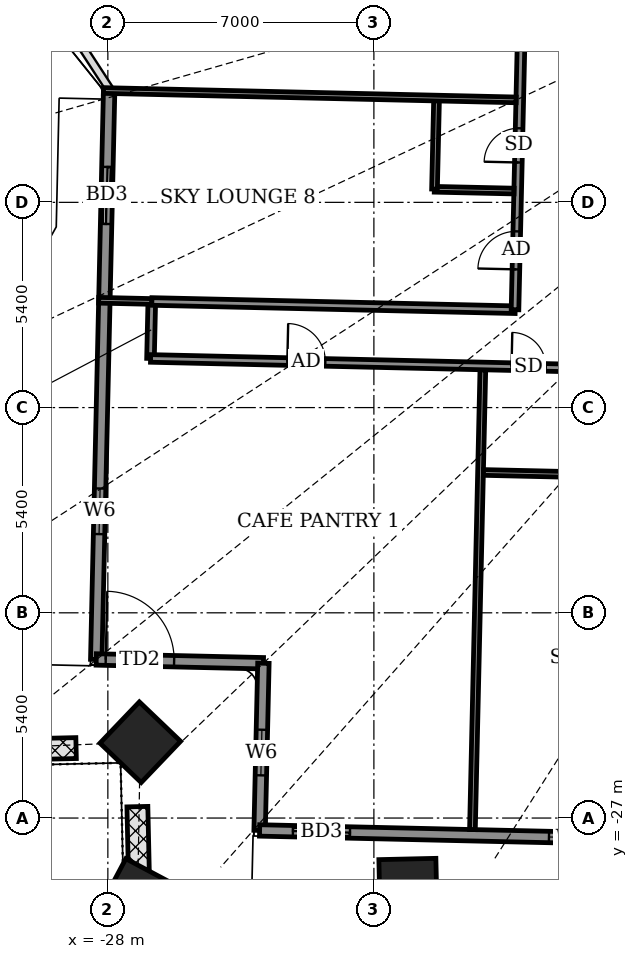
"""IFC4 building model, lengths in metres.
Left out: names, types, materials, properties, quantities, classifications, styles, units other than length and angle.
Written with IfcOpenShell. Run it as: python <this file> out.ifc"""

import sys

from ifc_helpers import new_model, si_unit, direction, frame, frame_2d, origin, origin_2d, place, context, subcontext, project, spatial, rectangle, extrude, element, fill, save


model = new_model("IFC4")
c1 = context("Model", 3, precision=1e-05, world=origin(), true_north=direction((0.0, 1.0)))
c2 = subcontext(c1, "Body", "Model", "MODEL_VIEW")
j1 = project(units=[si_unit("LENGTHUNIT", "METRE"), si_unit("PLANEANGLEUNIT", "RADIAN")], contexts=[c1])
p1 = place(None, origin())
s1 = spatial("IfcSite", under=j1, at=p1, CompositionType="ELEMENT")
p2 = place(p1, origin())
s2 = spatial("IfcBuilding", under=s1, at=p2, CompositionType="ELEMENT")
p3 = place(p2, frame((0.0, 0.0, 52.1)))
s3 = spatial("IfcBuildingStorey", under=s2, at=p3, CompositionType="ELEMENT", Elevation=52.1)
for number, where, z_axis, x_axis in (
    (1, (-27.147, -25.005, -0.55), (0.0, 0.0, 1.0), (0.723, -0.691, 0.0)),
    (2, (-27.217, -29.084, -0.55), (0.0, 0.0, 1.0), (0.883, -0.469, 0.0)),
    (3, (-20.102, -28.827, -0.55), (0.0, 0.0, 1.0), (1.0, 0.023, 0.0)),
):
    element("IfcColumn", number, at=place(p3, frame(where, z_axis=z_axis, x_axis=x_axis)), inside=s3, PredefinedType="COLUMN", context=c2, shape_type="SweptSolid", body=[
        extrude(rectangle(XDim=1.5, YDim=1.5, at=origin_2d()), origin(), (0.0, 0.0, 1.0), 4.6),
    ])
p4 = place(p3, frame((-27.965, -7.802, 0.0), z_axis=(0.0, 0.0, 1.0), x_axis=(-0.02267786199, -0.999742824218, 0.0)))
e4 = element("IfcWall", 4, at=p4, inside=s3, PredefinedType="SOLIDWALL", context=c2, shape_type="SweptSolid", body=[
    extrude(rectangle(XDim=15.029, YDim=0.3, at=frame_2d((7.514, 0.0))), origin(), (0.0, 0.0, 1.0), 2.1),
])
p5 = place(p4, frame((2.067, 0.0, 0.0)))
e5 = element("IfcOpeningElement", 5, at=p5, cuts=e4, PredefinedType="OPENING", context=c2, shape_type="SweptSolid", body=[
    extrude(rectangle(XDim=1.5, YDim=2.0, at=frame_2d((0.75, 1.0))), frame((0.0, 0.16, 0.0), z_axis=(0.0, -1.0, 0.0), x_axis=(1.0, 0.0, 0.0)), (0.0, 0.0, 1.0), 0.32),
])
p6 = place(p4, frame((10.53, 0.0, 0.5)))
e6 = element("IfcOpeningElement", 6, at=p6, cuts=e4, PredefinedType="OPENING", context=c2, shape_type="SweptSolid", body=[
    extrude(rectangle(XDim=1.2, YDim=1.1, at=frame_2d((0.6, 0.55))), frame((0.0, 0.16, 0.0), z_axis=(0.0, -1.0, 0.0), x_axis=(1.0, 0.0, 0.0)), (0.0, 0.0, 1.0), 0.32),
])
p7 = place(p3, frame((-28.306, -22.827, 0.0), z_axis=(0.0, 0.0, 1.0), x_axis=(0.999741204967, -0.022749133868, 0.0)))
e7 = element("IfcWall", 7, at=p7, inside=s3, PredefinedType="SOLIDWALL", context=c2, shape_type="SweptSolid", body=[
    extrude(rectangle(XDim=4.4, YDim=0.3, at=frame_2d((2.2, 0.0))), origin(), (0.0, 0.0, 1.0), 2.1),
])
p8 = place(p7, frame((0.25, 0.0, 0.0)))
e8 = element("IfcOpeningElement", 8, at=p8, cuts=e7, PredefinedType="OPENING", context=c2, shape_type="SweptSolid", body=[
    extrude(rectangle(XDim=1.8, YDim=2.0, at=frame_2d((0.9, 1.0))), frame((0.0, 0.16, 0.0), z_axis=(0.0, -1.0, 0.0), x_axis=(1.0, 0.0, 0.0)), (0.0, 0.0, 1.0), 0.32),
])
p9 = place(p3, frame((-23.907, -22.927, 0.0), z_axis=(0.0, 0.0, 1.0), x_axis=(-0.022749133868, -0.999741204967, 0.0)))
e9 = element("IfcWall", 9, at=p9, inside=s3, PredefinedType="SOLIDWALL", context=c2, shape_type="SweptSolid", body=[
    extrude(rectangle(XDim=4.4, YDim=0.3, at=frame_2d((2.2, 0.0))), origin(), (0.0, 0.0, 1.0), 2.1),
])
p10 = place(p9, frame((1.75, 0.0, 0.5)))
e10 = element("IfcOpeningElement", 10, at=p10, cuts=e9, PredefinedType="OPENING", context=c2, shape_type="SweptSolid", body=[
    extrude(rectangle(XDim=1.2, YDim=1.1, at=frame_2d((0.6, 0.55))), frame((0.0, 0.16, 0.0), z_axis=(0.0, -1.0, 0.0), x_axis=(1.0, 0.0, 0.0)), (0.0, 0.0, 1.0), 0.32),
])
p11 = place(p3, frame((-24.007, -27.326, 0.0), z_axis=(0.0, 0.0, 1.0), x_axis=(0.999742536491, -0.022690542744, 0.0)))
e11 = element("IfcWall", 11, at=p11, inside=s3, PredefinedType="SOLIDWALL", context=c2, shape_type="SweptSolid", body=[
    extrude(rectangle(XDim=49.236, YDim=0.3, at=frame_2d((24.618, 0.0))), origin(), (0.0, 0.0, 1.0), 2.1),
])
p12 = place(p11, frame((0.878, 0.0, 0.0)))
e12 = element("IfcOpeningElement", 12, at=p12, cuts=e11, PredefinedType="OPENING", context=c2, shape_type="SweptSolid", body=[
    extrude(rectangle(XDim=1.5, YDim=2.0, at=frame_2d((0.75, 1.0))), frame((0.0, 0.16, 0.0), z_axis=(0.0, -1.0, 0.0), x_axis=(1.0, 0.0, 0.0)), (0.0, 0.0, 1.0), 0.32),
])
p13 = place(p11, frame((7.616, 0.0, 0.5)))
e13 = element("IfcOpeningElement", 13, at=p13, cuts=e11, PredefinedType="OPENING", context=c2, shape_type="SweptSolid", body=[
    extrude(rectangle(XDim=1.2, YDim=1.1, at=frame_2d((0.6, 0.55))), frame((0.0, 0.16, 0.0), z_axis=(0.0, -1.0, 0.0), x_axis=(1.0, 0.0, 0.0)), (0.0, 0.0, 1.0), 0.32),
])
p14 = place(p11, frame((15.205, 0.0, 0.0)))
e14 = element("IfcOpeningElement", 14, at=p14, cuts=e11, PredefinedType="OPENING", context=c2, shape_type="SweptSolid", body=[
    extrude(rectangle(XDim=1.5, YDim=2.0, at=frame_2d((0.75, 1.0))), frame((0.0, 0.16, 0.0), z_axis=(0.0, -1.0, 0.0), x_axis=(1.0, 0.0, 0.0)), (0.0, 0.0, 1.0), 0.32),
])
p15 = place(p11, frame((20.663, 0.0, 0.0)))
e15 = element("IfcOpeningElement", 15, at=p15, cuts=e11, PredefinedType="OPENING", context=c2, shape_type="SweptSolid", body=[
    extrude(rectangle(XDim=1.5, YDim=2.0, at=frame_2d((0.75, 1.0))), frame((0.0, 0.16, 0.0), z_axis=(0.0, -1.0, 0.0), x_axis=(1.0, 0.0, 0.0)), (0.0, 0.0, 1.0), 0.32),
])
p16 = place(p11, frame((23.869, 0.0, 0.0)))
e16 = element("IfcOpeningElement", 16, at=p16, cuts=e11, PredefinedType="OPENING", context=c2, shape_type="SweptSolid", body=[
    extrude(rectangle(XDim=1.5, YDim=2.0, at=frame_2d((0.75, 1.0))), frame((0.0, 0.16, 0.0), z_axis=(0.0, -1.0, 0.0), x_axis=(1.0, 0.0, 0.0)), (0.0, 0.0, 1.0), 0.32),
])
p17 = place(p11, frame((30.183, 0.0, 0.5)))
e17 = element("IfcOpeningElement", 17, at=p17, cuts=e11, PredefinedType="OPENING", context=c2, shape_type="SweptSolid", body=[
    extrude(rectangle(XDim=1.2, YDim=1.1, at=frame_2d((0.6, 0.55))), frame((0.0, 0.16, 0.0), z_axis=(0.0, -1.0, 0.0), x_axis=(1.0, 0.0, 0.0)), (0.0, 0.0, 1.0), 0.32),
])
p18 = place(p11, frame((37.922, 0.0, 0.5)))
e18 = element("IfcOpeningElement", 18, at=p18, cuts=e11, PredefinedType="OPENING", context=c2, shape_type="SweptSolid", body=[
    extrude(rectangle(XDim=1.2, YDim=1.1, at=frame_2d((0.6, 0.55))), frame((0.0, 0.16, 0.0), z_axis=(0.0, -1.0, 0.0), x_axis=(1.0, 0.0, 0.0)), (0.0, 0.0, 1.0), 0.32),
])
p19 = place(p11, frame((44.248, 0.0, 0.5)))
e19 = element("IfcOpeningElement", 19, at=p19, cuts=e11, PredefinedType="OPENING", context=c2, shape_type="SweptSolid", body=[
    extrude(rectangle(XDim=1.2, YDim=1.1, at=frame_2d((0.6, 0.55))), frame((0.0, 0.16, 0.0), z_axis=(0.0, -1.0, 0.0), x_axis=(1.0, 0.0, 0.0)), (0.0, 0.0, 1.0), 0.32),
])
for number, where, z_axis, x_axis in (
    (20, (-27.174, -28.887, 0.0), (0.0, 0.0, 1.0), (-0.022, 1.0, 0.0)),
    (21, (-28.836, -25.159, 0.0), (0.0, 0.0, 1.0), (-1.0, -0.023, 0.0)),
):
    element("IfcWall", number, at=place(p3, frame(where, z_axis=z_axis, x_axis=x_axis)), inside=s3, PredefinedType="USERDEFINED", context=c2, shape_type="SweptSolid", body=[
        extrude(rectangle(XDim=2.188, YDim=0.55, at=frame_2d((1.094, 0.0))), origin(), (0.0, 0.0, 1.0), 0.8),
    ])
p20 = place(p3, frame((-18.407, -27.303, 0.0), z_axis=(0.0, 0.0, 1.0), x_axis=(0.02263844782, 0.9997437175, 0.0)))
e22 = element("IfcWall", 22, at=p20, inside=s3, PredefinedType="PARTITIONING", context=c2, shape_type="SweptSolid", body=[
    extrude(rectangle(XDim=12.1, YDim=0.15, at=frame_2d((6.05, 0.0))), origin(), (0.0, 0.0, 1.0), 2.1),
])
p21 = place(p3, frame((-18.117, -17.907, 0.0), z_axis=(0.0, 0.0, 1.0), x_axis=(0.999740478815, -0.022781023197, 0.0)))
e23 = element("IfcWall", 23, at=p21, inside=s3, PredefinedType="PARTITIONING", context=c2, shape_type="SweptSolid", body=[
    extrude(rectangle(XDim=2.325, YDim=0.15, at=frame_2d((1.163, 0.0))), origin(), (0.0, 0.0, 1.0), 2.1),
])
p22 = place(p3, frame((-26.878, -14.907, 0.0), z_axis=(0.0, 0.0, 1.0), x_axis=(0.022632637625, 0.99974384905, 0.0)))
e24 = element("IfcWall", 24, at=p22, inside=s3, PredefinedType="PARTITIONING", context=c2, shape_type="SweptSolid", body=[
    extrude(rectangle(XDim=1.5, YDim=0.2, at=frame_2d((0.75, 0.0))), origin(), (0.0, 0.0, 1.0), 4.05),
])
p23 = place(p3, frame((-26.876, -14.907, 0.0), z_axis=(0.0, 0.0, 1.0), x_axis=(0.99974254105, -0.022690341881, 0.0)))
e25 = element("IfcWall", 25, at=p23, inside=s3, PredefinedType="PARTITIONING", context=c2, shape_type="SweptSolid", body=[
    extrude(rectangle(XDim=53.024, YDim=0.2, at=frame_2d((26.512, 0.0))), origin(), (0.0, 0.0, 1.0), 2.1),
])
p24 = place(p23, frame((3.599, 0.0, 0.0)))
e26 = element("IfcOpeningElement", 26, at=p24, cuts=e25, PredefinedType="OPENING", context=c2, shape_type="SweptSolid", body=[
    extrude(rectangle(XDim=1.0, YDim=2.1, at=frame_2d((0.5, 1.05))), frame((0.0, 0.11, 0.0), z_axis=(0.0, -1.0, 0.0), x_axis=(1.0, 0.0, 0.0)), (0.0, 0.0, 1.0), 0.22),
])
p25 = place(p23, frame((13.425, 0.0, 0.0)))
e27 = element("IfcOpeningElement", 27, at=p25, cuts=e25, PredefinedType="OPENING", context=c2, shape_type="SweptSolid", body=[
    extrude(rectangle(XDim=1.0, YDim=2.1, at=frame_2d((0.5, 1.05))), frame((0.0, 0.11, 0.0), z_axis=(0.0, -1.0, 0.0), x_axis=(1.0, 0.0, 0.0)), (0.0, 0.0, 1.0), 0.22),
])
p26 = place(p23, frame((9.5, 0.0, 0.0)))
e28 = element("IfcOpeningElement", 28, at=p26, cuts=e25, PredefinedType="OPENING", context=c2, shape_type="SweptSolid", body=[
    extrude(rectangle(XDim=0.9, YDim=2.1, at=frame_2d((0.45, 1.05))), frame((0.0, 0.11, 0.0), z_axis=(0.0, -1.0, 0.0), x_axis=(1.0, 0.0, 0.0)), (0.0, 0.0, 1.0), 0.22),
])
p27 = place(p23, frame((17.525, 0.0, 0.0)))
e29 = element("IfcOpeningElement", 29, at=p27, cuts=e25, PredefinedType="OPENING", context=c2, shape_type="SweptSolid", body=[
    extrude(rectangle(XDim=0.9, YDim=2.1, at=frame_2d((0.45, 1.05))), frame((0.0, 0.11, 0.0), z_axis=(0.0, -1.0, 0.0), x_axis=(1.0, 0.0, 0.0)), (0.0, 0.0, 1.0), 0.22),
])
p28 = place(p23, frame((24.85, 0.0, 0.0)))
e30 = element("IfcOpeningElement", 30, at=p28, cuts=e25, PredefinedType="OPENING", context=c2, shape_type="SweptSolid", body=[
    extrude(rectangle(XDim=0.9, YDim=2.1, at=frame_2d((0.45, 1.05))), frame((0.0, 0.11, 0.0), z_axis=(0.0, -1.0, 0.0), x_axis=(1.0, 0.0, 0.0)), (0.0, 0.0, 1.0), 0.22),
])
p29 = place(p23, frame((27.35, 0.0, 0.0)))
e31 = element("IfcOpeningElement", 31, at=p29, cuts=e25, PredefinedType="OPENING", context=c2, shape_type="SweptSolid", body=[
    extrude(rectangle(XDim=0.9, YDim=2.1, at=frame_2d((0.45, 1.05))), frame((0.0, 0.11, 0.0), z_axis=(0.0, -1.0, 0.0), x_axis=(1.0, 0.0, 0.0)), (0.0, 0.0, 1.0), 0.22),
])
p30 = place(p23, frame((36.15, 0.0, 0.0)))
e32 = element("IfcOpeningElement", 32, at=p30, cuts=e25, PredefinedType="OPENING", context=c2, shape_type="SweptSolid", body=[
    extrude(rectangle(XDim=1.0, YDim=2.1, at=frame_2d((0.5, 1.05))), frame((0.0, 0.11, 0.0), z_axis=(0.0, -1.0, 0.0), x_axis=(1.0, 0.0, 0.0)), (0.0, 0.0, 1.0), 0.22),
])
p31 = place(p23, frame((32.2, 0.0, 0.0)))
e33 = element("IfcOpeningElement", 33, at=p31, cuts=e25, PredefinedType="OPENING", context=c2, shape_type="SweptSolid", body=[
    extrude(rectangle(XDim=0.9, YDim=2.1, at=frame_2d((0.45, 1.05))), frame((0.0, 0.11, 0.0), z_axis=(0.0, -1.0, 0.0), x_axis=(1.0, 0.0, 0.0)), (0.0, 0.0, 1.0), 0.22),
])
p32 = place(p23, frame((40.675, 0.0, 0.0)))
e34 = element("IfcOpeningElement", 34, at=p32, cuts=e25, PredefinedType="OPENING", context=c2, shape_type="SweptSolid", body=[
    extrude(rectangle(XDim=1.0, YDim=2.1, at=frame_2d((0.5, 1.05))), frame((0.0, 0.11, 0.0), z_axis=(0.0, -1.0, 0.0), x_axis=(1.0, 0.0, 0.0)), (0.0, 0.0, 1.0), 0.22),
])
p33 = place(p23, frame((43.65, 0.0, 0.0)))
e35 = element("IfcOpeningElement", 35, at=p33, cuts=e25, PredefinedType="OPENING", context=c2, shape_type="SweptSolid", body=[
    extrude(rectangle(XDim=0.9, YDim=2.1, at=frame_2d((0.45, 1.05))), frame((0.0, 0.11, 0.0), z_axis=(0.0, -1.0, 0.0), x_axis=(1.0, 0.0, 0.0)), (0.0, 0.0, 1.0), 0.22),
])
p34 = place(p23, frame((51.824, 0.0, 0.0)))
e36 = element("IfcOpeningElement", 36, at=p34, cuts=e25, PredefinedType="OPENING", context=c2, shape_type="SweptSolid", body=[
    extrude(rectangle(XDim=1.0, YDim=2.1, at=frame_2d((0.5, 1.05))), frame((0.0, 0.11, 0.0), z_axis=(0.0, -1.0, 0.0), x_axis=(1.0, 0.0, 0.0)), (0.0, 0.0, 1.0), 0.22),
])
p35 = place(p23, frame((46.15, 0.0, 0.0)))
e37 = element("IfcOpeningElement", 37, at=p35, cuts=e25, PredefinedType="OPENING", context=c2, shape_type="SweptSolid", body=[
    extrude(rectangle(XDim=0.9, YDim=2.1, at=frame_2d((0.45, 1.05))), frame((0.0, 0.11, 0.0), z_axis=(0.0, -1.0, 0.0), x_axis=(1.0, 0.0, 0.0)), (0.0, 0.0, 1.0), 0.22),
])
p36 = place(p3, frame((-28.242, -13.376, 0.0), z_axis=(0.0, 0.0, 1.0), x_axis=(0.999739128131, -0.022840220751, 0.0)))
e38 = element("IfcWall", 38, at=p36, inside=s3, PredefinedType="PARTITIONING", context=c2, shape_type="SweptSolid", body=[
    extrude(rectangle(XDim=1.4, YDim=0.15, at=frame_2d((0.7, 0.0))), origin(), (0.0, 0.0, 1.0), 2.15),
])
p37 = place(p3, frame((-26.842, -13.408, 0.0), z_axis=(0.0, 0.0, 1.0), x_axis=(0.999742388837, -0.022697047441, 0.0)))
e39 = element("IfcWall", 39, at=p37, inside=s3, PredefinedType="PARTITIONING", context=c2, shape_type="SweptSolid", body=[
    extrude(rectangle(XDim=9.562, YDim=0.2, at=frame_2d((4.781, 0.0))), origin(), (0.0, 0.0, 1.0), 2.1),
])
p38 = place(p3, frame((-17.287, -13.625, 0.0), z_axis=(0.0, 0.0, 1.0), x_axis=(0.022712214871, 0.999742044377, 0.0)))
e40 = element("IfcWall", 40, at=p38, inside=s3, PredefinedType="PARTITIONING", context=c2, shape_type="SweptSolid", body=[
    extrude(rectangle(XDim=26.551, YDim=0.2, at=frame_2d((13.275, 0.0))), origin(), (0.0, 0.0, 1.0), 2.1),
])
p39 = place(p38, frame((17.0, 0.0, 0.0)))
e41 = element("IfcOpeningElement", 41, at=p39, cuts=e40, PredefinedType="OPENING", context=c2, shape_type="SweptSolid", body=[
    extrude(rectangle(XDim=1.0, YDim=2.1, at=frame_2d((0.5, 1.05))), frame((0.0, 0.11, 0.0), z_axis=(0.0, -1.0, 0.0), x_axis=(1.0, 0.0, 0.0)), (0.0, 0.0, 1.0), 0.22),
])
p40 = place(p38, frame((14.075, 0.0, 0.0)))
e42 = element("IfcOpeningElement", 42, at=p40, cuts=e40, PredefinedType="OPENING", context=c2, shape_type="SweptSolid", body=[
    extrude(rectangle(XDim=0.9, YDim=2.1, at=frame_2d((0.45, 1.05))), frame((0.0, 0.11, 0.0), z_axis=(0.0, -1.0, 0.0), x_axis=(1.0, 0.0, 0.0)), (0.0, 0.0, 1.0), 0.22),
])
p41 = place(p38, frame((9.061, 0.0, 0.0)))
e43 = element("IfcOpeningElement", 43, at=p41, cuts=e40, PredefinedType="OPENING", context=c2, shape_type="SweptSolid", body=[
    extrude(rectangle(XDim=1.0, YDim=2.1, at=frame_2d((0.5, 1.05))), frame((0.0, 0.11, 0.0), z_axis=(0.0, -1.0, 0.0), x_axis=(1.0, 0.0, 0.0)), (0.0, 0.0, 1.0), 0.22),
])
p42 = place(p38, frame((1.062, 0.0, 0.0)))
e44 = element("IfcOpeningElement", 44, at=p42, cuts=e40, PredefinedType="OPENING", context=c2, shape_type="SweptSolid", body=[
    extrude(rectangle(XDim=1.0, YDim=2.1, at=frame_2d((0.5, 1.05))), frame((0.0, 0.11, 0.0), z_axis=(0.0, -1.0, 0.0), x_axis=(1.0, 0.0, 0.0)), (0.0, 0.0, 1.0), 0.22),
])
p43 = place(p38, frame((3.875, 0.0, 0.0)))
e45 = element("IfcOpeningElement", 45, at=p43, cuts=e40, PredefinedType="OPENING", context=c2, shape_type="SweptSolid", body=[
    extrude(rectangle(XDim=0.9, YDim=2.1, at=frame_2d((0.45, 1.05))), frame((0.0, 0.11, 0.0), z_axis=(0.0, -1.0, 0.0), x_axis=(1.0, 0.0, 0.0)), (0.0, 0.0, 1.0), 0.22),
])
p44 = place(p3, frame((-19.41, -10.456, 0.0), z_axis=(0.0, 0.0, 1.0), x_axis=(0.999750703499, -0.022327804475, 0.0)))
e46 = element("IfcWall", 46, at=p44, inside=s3, PredefinedType="PARTITIONING", context=c2, shape_type="SweptSolid", body=[
    extrude(rectangle(XDim=2.099, YDim=0.15, at=frame_2d((1.05, 0.0))), origin(), (0.0, 0.0, 1.0), 2.1),
])
p45 = place(p3, frame((-19.405, -10.451, 0.0), z_axis=(0.0, 0.0, 1.0), x_axis=(0.022781023197, 0.999740478815, 0.0)))
e47 = element("IfcWall", 47, at=p45, inside=s3, PredefinedType="PARTITIONING", context=c2, shape_type="SweptSolid", body=[
    extrude(rectangle(XDim=2.325, YDim=0.15, at=frame_2d((1.163, 0.0))), origin(), (0.0, 0.0, 1.0), 2.15),
])
p46 = place(p3, frame((-28.116, -7.857, 0.0), z_axis=(0.0, 0.0, 1.0), x_axis=(0.999741301527, -0.022744890004, 0.0)))
e48 = element("IfcWall", 48, at=p46, inside=s3, PredefinedType="PARTITIONING", context=c2, shape_type="SweptSolid", body=[
    extrude(rectangle(XDim=10.863, YDim=0.15, at=frame_2d((5.431, 0.0))), origin(), (0.0, 0.0, 1.0), 2.15),
])
p47 = place(p5, origin())
e49 = element("IfcDoor", 49, at=p47, inside=s3, OperationType="SLIDING_TO_LEFT", PredefinedType="DOOR", context=c2, shape_type="SweptSolid", body=[
    extrude(rectangle(XDim=1.5, YDim=2.0, at=frame_2d((0.75, 1.0))), frame((0.0, 0.025, 0.0), z_axis=(0.0, -1.0, 0.0), x_axis=(1.0, 0.0, 0.0)), (0.0, 0.0, 1.0), 0.05),
])
fill(e5, e49)
p48 = place(p6, origin())
e50 = element("IfcWindow", 50, at=p48, inside=s3, PartitioningType="SINGLE_PANEL", PredefinedType="WINDOW", context=c2, shape_type="SweptSolid", body=[
    extrude(rectangle(XDim=1.2, YDim=1.1, at=frame_2d((0.6, 0.55))), frame((0.0, 0.03, 0.0), z_axis=(0.0, -1.0, 0.0), x_axis=(1.0, 0.0, 0.0)), (0.0, 0.0, 1.0), 0.06),
])
fill(e6, e50)
p49 = place(p8, origin())
e51 = element("IfcDoor", 51, at=p49, inside=s3, OperationType="DOUBLE_DOOR_SINGLE_SWING", PredefinedType="DOOR", context=c2, shape_type="SweptSolid", body=[
    extrude(rectangle(XDim=1.8, YDim=2.0, at=frame_2d((0.9, 1.0))), frame((0.0, 0.025, 0.0), z_axis=(0.0, -1.0, 0.0), x_axis=(1.0, 0.0, 0.0)), (0.0, 0.0, 1.0), 0.05),
])
fill(e8, e51)
p50 = place(p10, origin())
e52 = element("IfcWindow", 52, at=p50, inside=s3, PartitioningType="SINGLE_PANEL", PredefinedType="WINDOW", context=c2, shape_type="SweptSolid", body=[
    extrude(rectangle(XDim=1.2, YDim=1.1, at=frame_2d((0.6, 0.55))), frame((0.0, 0.03, 0.0), z_axis=(0.0, -1.0, 0.0), x_axis=(1.0, 0.0, 0.0)), (0.0, 0.0, 1.0), 0.06),
])
fill(e10, e52)
p51 = place(p12, origin())
e53 = element("IfcDoor", 53, at=p51, inside=s3, OperationType="SLIDING_TO_LEFT", PredefinedType="DOOR", context=c2, shape_type="SweptSolid", body=[
    extrude(rectangle(XDim=1.5, YDim=2.0, at=frame_2d((0.75, 1.0))), frame((0.0, 0.025, 0.0), z_axis=(0.0, -1.0, 0.0), x_axis=(1.0, 0.0, 0.0)), (0.0, 0.0, 1.0), 0.05),
])
fill(e12, e53)
p52 = place(p13, origin())
e54 = element("IfcWindow", 54, at=p52, inside=s3, PartitioningType="SINGLE_PANEL", PredefinedType="WINDOW", context=c2, shape_type="SweptSolid", body=[
    extrude(rectangle(XDim=1.2, YDim=1.1, at=frame_2d((0.6, 0.55))), frame((0.0, 0.03, 0.0), z_axis=(0.0, -1.0, 0.0), x_axis=(1.0, 0.0, 0.0)), (0.0, 0.0, 1.0), 0.06),
])
fill(e13, e54)
p53 = place(p24, origin())
e55 = element("IfcDoor", 55, at=p53, inside=s3, OperationType="SINGLE_SWING_LEFT", PredefinedType="DOOR", context=c2, shape_type="SweptSolid", body=[
    extrude(rectangle(XDim=1.0, YDim=2.1, at=frame_2d((0.5, 1.05))), frame((0.0, 0.025, 0.0), z_axis=(0.0, -1.0, 0.0), x_axis=(1.0, 0.0, 0.0)), (0.0, 0.0, 1.0), 0.05),
])
fill(e26, e55)
p54 = place(p26, origin())
e56 = element("IfcDoor", 56, at=p54, inside=s3, OperationType="SINGLE_SWING_LEFT", PredefinedType="DOOR", context=c2, shape_type="SweptSolid", body=[
    extrude(rectangle(XDim=0.9, YDim=2.1, at=frame_2d((0.45, 1.05))), frame((0.0, 0.025, 0.0), z_axis=(0.0, -1.0, 0.0), x_axis=(1.0, 0.0, 0.0)), (0.0, 0.0, 1.0), 0.05),
])
fill(e28, e56)
p55 = place(p42, origin())
e57 = element("IfcDoor", 57, at=p55, inside=s3, OperationType="SINGLE_SWING_RIGHT", PredefinedType="DOOR", context=c2, shape_type="SweptSolid", body=[
    extrude(rectangle(XDim=1.0, YDim=2.1, at=frame_2d((0.5, 1.05))), frame((0.0, 0.025, 0.0), z_axis=(0.0, -1.0, 0.0), x_axis=(1.0, 0.0, 0.0)), (0.0, 0.0, 1.0), 0.05),
])
fill(e44, e57)
p56 = place(p43, origin())
e58 = element("IfcDoor", 58, at=p56, inside=s3, OperationType="SINGLE_SWING_LEFT", PredefinedType="DOOR", context=c2, shape_type="SweptSolid", body=[
    extrude(rectangle(XDim=0.9, YDim=2.1, at=frame_2d((0.45, 1.05))), frame((0.0, 0.025, 0.0), z_axis=(0.0, -1.0, 0.0), x_axis=(1.0, 0.0, 0.0)), (0.0, 0.0, 1.0), 0.05),
])
fill(e45, e58)
save(model, sys.argv[1])
